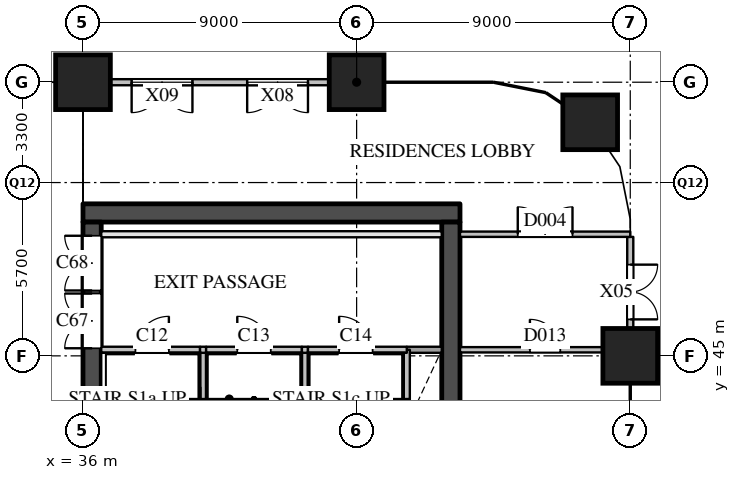
"""IFC4 building model, lengths in metres.
Left out: names, types, materials, properties, quantities, classifications, styles, units other than length and angle.
Written with IfcOpenShell. Run it as: python <this file> out.ifc"""

import sys

from ifc_helpers import new_model, si_unit, direction, frame, frame_2d, origin, origin_2d, place, context, subcontext, project, spatial, rectangle, extrude, element, fill, save


model = new_model("IFC4")
c1 = context("Model", 3, precision=1e-05, world=origin(), true_north=direction((0.0, 1.0)))
c2 = subcontext(c1, "Body", "Model", "MODEL_VIEW")
j1 = project(units=[si_unit("LENGTHUNIT", "METRE"), si_unit("PLANEANGLEUNIT", "RADIAN")], contexts=[c1])
p1 = place(None, origin())
s1 = spatial("IfcSite", under=j1, at=p1, CompositionType="ELEMENT")
p2 = place(p1, origin())
s2 = spatial("IfcBuilding", under=s1, at=p2, CompositionType="ELEMENT")
p3 = place(p2, origin())
s3 = spatial("IfcBuildingStorey", under=s2, at=p3, CompositionType="ELEMENT", Elevation=0.0)
for number, where, z_axis, x_axis in (
    (1, (36.0, 54.0, 0.0), (0.0, 0.0, 1.0), (1.0, 0.0, 0.0)),
    (2, (45.0, 54.0, 0.0), (0.0, 0.0, 1.0), (1.0, 0.0, 0.0)),
    (3, (54.0, 45.0, 0.0), (0.0, 0.0, 1.0), (1.0, 0.0, 0.0)),
    (4, (52.682, 52.682, 0.0), (0.0, 0.0, 1.0), (1.0, 0.0, 0.0)),
):
    element("IfcColumn", number, at=place(p3, frame(where, z_axis=z_axis, x_axis=x_axis)), inside=s3, PredefinedType="COLUMN", context=c2, shape_type="SweptSolid", body=[
        extrude(rectangle(XDim=1.8, YDim=1.8, at=origin_2d()), origin(), (0.0, 0.0, 1.0), 8.0),
    ])
p4 = place(p3, frame((54.0, 45.9, 0.0), z_axis=(0.0, 0.0, 1.0), x_axis=(0.0, 1.0, 0.0)))
e5 = element("IfcWall", 5, at=p4, inside=s3, PredefinedType="SOLIDWALL", context=c2, shape_type="SweptSolid", body=[
    extrude(rectangle(XDim=3.013, YDim=0.2, at=frame_2d((1.506, 0.0))), origin(), (0.0, 0.0, 1.0), 6.59),
])
p5 = place(p4, frame((2.1, 0.0, 0.0), z_axis=(0.0, 0.0, 1.0), x_axis=(-1.0, 0.0, 0.0)))
e6 = element("IfcOpeningElement", 6, at=p5, cuts=e5, PredefinedType="OPENING", context=c2, shape_type="SweptSolid", body=[
    extrude(rectangle(XDim=1.8, YDim=2.4, at=frame_2d((0.9, 1.2))), frame((0.0, 0.11, 0.0), z_axis=(0.0, -1.0, 0.0), x_axis=(1.0, 0.0, 0.0)), (0.0, 0.0, 1.0), 0.22),
])
p6 = place(p3, frame((44.1, 54.0, 0.0), z_axis=(0.0, 0.0, 1.0), x_axis=(-1.0, 0.0, 0.0)))
e7 = element("IfcWall", 7, at=p6, inside=s3, PredefinedType="SOLIDWALL", context=c2, shape_type="SweptSolid", body=[
    extrude(rectangle(XDim=7.2, YDim=0.2, at=frame_2d((3.6, 0.0))), origin(), (0.0, 0.0, 1.0), 6.59),
])
p7 = place(p6, frame((0.7, 0.0, 0.0)))
e8 = element("IfcOpeningElement", 8, at=p7, cuts=e7, PredefinedType="OPENING", context=c2, shape_type="SweptSolid", body=[
    extrude(rectangle(XDim=2.0, YDim=2.4, at=frame_2d((1.0, 1.2))), frame((0.0, 0.11, 0.0), z_axis=(0.0, -1.0, 0.0), x_axis=(1.0, 0.0, 0.0)), (0.0, 0.0, 1.0), 0.22),
])
p8 = place(p6, frame((0.7, 0.0, 2.5)))
e9 = element("IfcOpeningElement", 9, at=p8, cuts=e7, PredefinedType="OPENING", context=c2, shape_type="SweptSolid", body=[
    extrude(rectangle(XDim=2.0, YDim=3.99, at=frame_2d((1.0, 1.995))), frame((0.0, 0.11, 0.0), z_axis=(0.0, -1.0, 0.0), x_axis=(1.0, 0.0, 0.0)), (0.0, 0.0, 1.0), 0.22),
])
p9 = place(p6, frame((4.5, 0.0, 0.0)))
e10 = element("IfcOpeningElement", 10, at=p9, cuts=e7, PredefinedType="OPENING", context=c2, shape_type="SweptSolid", body=[
    extrude(rectangle(XDim=2.0, YDim=2.4, at=frame_2d((1.0, 1.2))), frame((0.0, 0.11, 0.0), z_axis=(0.0, -1.0, 0.0), x_axis=(1.0, 0.0, 0.0)), (0.0, 0.0, 1.0), 0.22),
])
p10 = place(p6, frame((4.5, 0.0, 2.5)))
e11 = element("IfcOpeningElement", 11, at=p10, cuts=e7, PredefinedType="OPENING", context=c2, shape_type="SweptSolid", body=[
    extrude(rectangle(XDim=2.0, YDim=3.99, at=frame_2d((1.0, 1.995))), frame((0.0, 0.11, 0.0), z_axis=(0.0, -1.0, 0.0), x_axis=(1.0, 0.0, 0.0)), (0.0, 0.0, 1.0), 0.22),
])
p11 = place(p3, frame((36.0, 49.7, 0.0), z_axis=(0.0, 0.0, 1.0), x_axis=(1.0, 0.0, 0.0)))
e12 = element("IfcWall", 12, at=p11, inside=s3, PredefinedType="SHEAR", context=c2, shape_type="SweptSolid", body=[
    extrude(rectangle(XDim=12.4, YDim=0.6, at=frame_2d((6.2, 0.0))), origin(), (0.0, 0.0, 1.0), 7.59),
])
p12 = place(p3, frame((36.3, 29.1, 0.0), z_axis=(0.0, 0.0, 1.0), x_axis=(0.0, 1.0, 0.0)))
e13 = element("IfcWall", 13, at=p12, inside=s3, PredefinedType="SHEAR", context=c2, shape_type="SweptSolid", body=[
    extrude(rectangle(XDim=20.3, YDim=0.6, at=frame_2d((10.15, 0.0))), origin(), (0.0, 0.0, 1.0), 7.59),
])
p13 = place(p12, frame((3.6, 0.0, 0.0)))
e14 = element("IfcOpeningElement", 14, at=p13, cuts=e13, PredefinedType="OPENING", context=c2, shape_type="SweptSolid", body=[
    extrude(rectangle(XDim=1.8, YDim=2.1, at=frame_2d((0.9, 1.05))), frame((0.0, 0.31, 0.0), z_axis=(0.0, -1.0, 0.0), x_axis=(1.0, 0.0, 0.0)), (0.0, 0.0, 1.0), 0.62),
])
p14 = place(p12, frame((16.15, 0.0, 0.0)))
e15 = element("IfcOpeningElement", 15, at=p14, cuts=e13, PredefinedType="OPENING", context=c2, shape_type="SweptSolid", body=[
    extrude(rectangle(XDim=1.8, YDim=2.4, at=frame_2d((0.9, 1.2))), frame((0.0, 0.31, 0.0), z_axis=(0.0, -1.0, 0.0), x_axis=(1.0, 0.0, 0.0)), (0.0, 0.0, 1.0), 0.62),
])
p15 = place(p12, frame((18.05, 0.0, 0.0)))
e16 = element("IfcOpeningElement", 16, at=p15, cuts=e13, PredefinedType="OPENING", context=c2, shape_type="SweptSolid", body=[
    extrude(rectangle(XDim=1.8, YDim=2.4, at=frame_2d((0.9, 1.2))), frame((0.0, 0.31, 0.0), z_axis=(0.0, -1.0, 0.0), x_axis=(1.0, 0.0, 0.0)), (0.0, 0.0, 1.0), 0.62),
])
p16 = place(p3, frame((48.1, 29.1, 0.0), z_axis=(0.0, 0.0, 1.0), x_axis=(0.0, 1.0, 0.0)))
e17 = element("IfcWall", 17, at=p16, inside=s3, PredefinedType="SHEAR", context=c2, shape_type="SweptSolid", body=[
    extrude(rectangle(XDim=20.3, YDim=0.6, at=frame_2d((10.15, 0.0))), origin(), (0.0, 0.0, 1.0), 7.59),
])
p17 = place(p16, frame((12.5, 0.0, 0.0)))
e18 = element("IfcOpeningElement", 18, at=p17, cuts=e17, PredefinedType="OPENING", context=c2, shape_type="SweptSolid", body=[
    extrude(rectangle(XDim=0.7, YDim=2.1, at=frame_2d((0.35, 1.05))), frame((0.0, 0.31, 0.0), z_axis=(0.0, -1.0, 0.0), x_axis=(1.0, 0.0, 0.0)), (0.0, 0.0, 1.0), 0.62),
])
p18 = place(p16, frame((4.0, 0.0, 0.0)))
e19 = element("IfcOpeningElement", 19, at=p18, cuts=e17, PredefinedType="OPENING", context=c2, shape_type="SweptSolid", body=[
    extrude(rectangle(XDim=1.0, YDim=2.1, at=frame_2d((0.5, 1.05))), frame((0.0, 0.31, 0.0), z_axis=(0.0, -1.0, 0.0), x_axis=(1.0, 0.0, 0.0)), (0.0, 0.0, 1.0), 0.62),
])
p19 = place(p3, frame((39.95, 41.06, 0.0), z_axis=(0.0, 0.0, 1.0), x_axis=(0.0, 1.0, 0.0)))
e20 = element("IfcWall", 20, at=p19, inside=s3, PredefinedType="SOLIDWALL", context=c2, shape_type="SweptSolid", body=[
    extrude(rectangle(XDim=2.52, YDim=0.2, at=frame_2d((1.26, 0.0))), origin(), (0.0, 0.0, 1.0), 7.59),
])
p20 = place(p3, frame((39.95, 43.58, 0.0), z_axis=(0.0, 0.0, 1.0), x_axis=(0.0, 1.0, 0.0)))
e21 = element("IfcWall", 21, at=p20, inside=s3, PredefinedType="SOLIDWALL", context=c2, shape_type="SweptSolid", body=[
    extrude(rectangle(XDim=1.62, YDim=0.2, at=frame_2d((0.81, 0.0))), origin(), (0.0, 0.0, 1.0), 7.59),
])
p21 = place(p3, frame((43.3, 41.06, 0.0), z_axis=(0.0, 0.0, 1.0), x_axis=(0.0, 1.0, 0.0)))
e22 = element("IfcWall", 22, at=p21, inside=s3, PredefinedType="SOLIDWALL", context=c2, shape_type="SweptSolid", body=[
    extrude(rectangle(XDim=2.52, YDim=0.2, at=frame_2d((1.26, 0.0))), origin(), (0.0, 0.0, 1.0), 7.59),
])
p22 = place(p3, frame((43.3, 43.58, 0.0), z_axis=(0.0, 0.0, 1.0), x_axis=(0.0, 1.0, 0.0)))
e23 = element("IfcWall", 23, at=p22, inside=s3, PredefinedType="SOLIDWALL", context=c2, shape_type="SweptSolid", body=[
    extrude(rectangle(XDim=1.62, YDim=0.2, at=frame_2d((0.81, 0.0))), origin(), (0.0, 0.0, 1.0), 7.59),
])
p23 = place(p3, frame((46.65, 41.06, 0.0), z_axis=(0.0, 0.0, 1.0), x_axis=(0.0, 1.0, 0.0)))
e24 = element("IfcWall", 24, at=p23, inside=s3, PredefinedType="SOLIDWALL", context=c2, shape_type="SweptSolid", body=[
    extrude(rectangle(XDim=2.52, YDim=0.2, at=frame_2d((1.26, 0.0))), origin(), (0.0, 0.0, 1.0), 7.59),
])
p24 = place(p3, frame((46.65, 43.58, 0.0), z_axis=(0.0, 0.0, 1.0), x_axis=(0.0, 1.0, 0.0)))
e25 = element("IfcWall", 25, at=p24, inside=s3, PredefinedType="SOLIDWALL", context=c2, shape_type="SweptSolid", body=[
    extrude(rectangle(XDim=1.62, YDim=0.2, at=frame_2d((0.81, 0.0))), origin(), (0.0, 0.0, 1.0), 7.59),
])
p25 = place(p3, frame((46.65, 45.2, 0.0), z_axis=(0.0, 0.0, 1.0), x_axis=(1.0, 0.0, 0.0)))
e26 = element("IfcWall", 26, at=p25, inside=s3, PredefinedType="SOLIDWALL", context=c2, shape_type="SweptSolid", body=[
    extrude(rectangle(XDim=1.15, YDim=0.2, at=frame_2d((0.575, 0.0))), origin(), (0.0, 0.0, 1.0), 7.59),
])
p26 = place(p3, frame((36.6, 45.2, 0.0), z_axis=(0.0, 0.0, 1.0), x_axis=(1.0, 0.0, 0.0)))
e27 = element("IfcWall", 27, at=p26, inside=s3, PredefinedType="SOLIDWALL", context=c2, shape_type="SweptSolid", body=[
    extrude(rectangle(XDim=3.25, YDim=0.2, at=frame_2d((1.625, 0.0))), origin(), (0.0, 0.0, 1.0), 7.59),
])
p27 = place(p26, frame((1.125, 0.0, 0.0)))
e28 = element("IfcOpeningElement", 28, at=p27, cuts=e27, PredefinedType="OPENING", context=c2, shape_type="SweptSolid", body=[
    extrude(rectangle(XDim=1.1, YDim=2.1, at=frame_2d((0.55, 1.05))), frame((0.0, 0.11, 0.0), z_axis=(0.0, -1.0, 0.0), x_axis=(1.0, 0.0, 0.0)), (0.0, 0.0, 1.0), 0.22),
])
p28 = place(p3, frame((39.85, 45.2, 0.0), z_axis=(0.0, 0.0, 1.0), x_axis=(1.0, 0.0, 0.0)))
e29 = element("IfcWall", 29, at=p28, inside=s3, PredefinedType="SOLIDWALL", context=c2, shape_type="SweptSolid", body=[
    extrude(rectangle(XDim=0.2, YDim=0.2, at=frame_2d((0.1, 0.0))), origin(), (0.0, 0.0, 1.0), 7.59),
])
p29 = place(p3, frame((40.05, 45.2, 0.0), z_axis=(0.0, 0.0, 1.0), x_axis=(1.0, 0.0, 0.0)))
e30 = element("IfcWall", 30, at=p29, inside=s3, PredefinedType="SOLIDWALL", context=c2, shape_type="SweptSolid", body=[
    extrude(rectangle(XDim=3.15, YDim=0.2, at=frame_2d((1.575, 0.0))), origin(), (0.0, 0.0, 1.0), 7.59),
])
p30 = place(p29, frame((1.025, 0.0, 0.0)))
e31 = element("IfcOpeningElement", 31, at=p30, cuts=e30, PredefinedType="OPENING", context=c2, shape_type="SweptSolid", body=[
    extrude(rectangle(XDim=1.1, YDim=2.1, at=frame_2d((0.55, 1.05))), frame((0.0, 0.11, 0.0), z_axis=(0.0, -1.0, 0.0), x_axis=(1.0, 0.0, 0.0)), (0.0, 0.0, 1.0), 0.22),
])
p31 = place(p3, frame((43.2, 45.2, 0.0), z_axis=(0.0, 0.0, 1.0), x_axis=(1.0, 0.0, 0.0)))
e32 = element("IfcWall", 32, at=p31, inside=s3, PredefinedType="SOLIDWALL", context=c2, shape_type="SweptSolid", body=[
    extrude(rectangle(XDim=0.2, YDim=0.2, at=frame_2d((0.1, 0.0))), origin(), (0.0, 0.0, 1.0), 7.59),
])
p32 = place(p3, frame((43.4, 45.2, 0.0), z_axis=(0.0, 0.0, 1.0), x_axis=(1.0, 0.0, 0.0)))
e33 = element("IfcWall", 33, at=p32, inside=s3, PredefinedType="SOLIDWALL", context=c2, shape_type="SweptSolid", body=[
    extrude(rectangle(XDim=3.25, YDim=0.2, at=frame_2d((1.625, 0.0))), origin(), (0.0, 0.0, 1.0), 7.59),
])
p33 = place(p32, frame((1.025, 0.0, 0.0)))
e34 = element("IfcOpeningElement", 34, at=p33, cuts=e33, PredefinedType="OPENING", context=c2, shape_type="SweptSolid", body=[
    extrude(rectangle(XDim=1.1, YDim=2.1, at=frame_2d((0.55, 1.05))), frame((0.0, 0.11, 0.0), z_axis=(0.0, -1.0, 0.0), x_axis=(1.0, 0.0, 0.0)), (0.0, 0.0, 1.0), 0.22),
])
p34 = place(p3, frame((36.6, 49.0, 0.0), z_axis=(0.0, 0.0, 1.0), x_axis=(1.0, 0.0, 0.0)))
e35 = element("IfcWall", 35, at=p34, inside=s3, PredefinedType="PARTITIONING", context=c2, shape_type="SweptSolid", body=[
    extrude(rectangle(XDim=11.2, YDim=0.2, at=frame_2d((5.6, 0.0))), origin(), (0.0, 0.0, 1.0), 7.59),
])
p35 = place(p3, frame((48.4, 45.2, 0.0), z_axis=(0.0, 0.0, 1.0), x_axis=(1.0, 0.0, 0.0)))
e36 = element("IfcWall", 36, at=p35, inside=s3, PredefinedType="PARTITIONING", context=c2, shape_type="SweptSolid", body=[
    extrude(rectangle(XDim=5.6, YDim=0.175, at=frame_2d((2.8, 0.0))), origin(), (0.0, 0.0, 1.0), 7.59),
])
p36 = place(p35, frame((2.3, 0.0, 0.0)))
e37 = element("IfcOpeningElement", 37, at=p36, cuts=e36, PredefinedType="OPENING", context=c2, shape_type="SweptSolid", body=[
    extrude(rectangle(XDim=1.0, YDim=2.1, at=frame_2d((0.5, 1.05))), frame((0.0, 0.097, 0.0), z_axis=(0.0, -1.0, 0.0), x_axis=(1.0, 0.0, 0.0)), (0.0, 0.0, 1.0), 0.195),
])
p37 = place(p3, frame((48.4, 49.0, 0.0), z_axis=(0.0, 0.0, 1.0), x_axis=(1.0, 0.0, 0.0)))
e38 = element("IfcWall", 38, at=p37, inside=s3, PredefinedType="PARTITIONING", context=c2, shape_type="SweptSolid", body=[
    extrude(rectangle(XDim=5.6, YDim=0.175, at=frame_2d((2.8, 0.0))), origin(), (0.0, 0.0, 1.0), 6.59),
])
p38 = place(p37, frame((1.9, 0.0, 0.0)))
e39 = element("IfcOpeningElement", 39, at=p38, cuts=e38, PredefinedType="OPENING", context=c2, shape_type="SweptSolid", body=[
    extrude(rectangle(XDim=1.8, YDim=2.1, at=frame_2d((0.9, 1.05))), frame((0.0, 0.097, 0.0), z_axis=(0.0, -1.0, 0.0), x_axis=(1.0, 0.0, 0.0)), (0.0, 0.0, 1.0), 0.195),
])
p39 = place(p5, origin())
e40 = element("IfcDoor", 40, at=p39, inside=s3, OperationType="DOUBLE_DOOR_SINGLE_SWING", PredefinedType="DOOR", context=c2, shape_type="SweptSolid", body=[
    extrude(rectangle(XDim=1.8, YDim=2.4, at=frame_2d((0.9, 1.2))), frame((0.0, 0.025, 0.0), z_axis=(0.0, -1.0, 0.0), x_axis=(1.0, 0.0, 0.0)), (0.0, 0.0, 1.0), 0.05),
])
fill(e6, e40)
p40 = place(p7, origin())
e41 = element("IfcDoor", 41, at=p40, inside=s3, OperationType="DOUBLE_DOOR_SINGLE_SWING", PredefinedType="DOOR", context=c2, shape_type="SweptSolid", body=[
    extrude(rectangle(XDim=2.0, YDim=2.4, at=frame_2d((1.0, 1.2))), frame((0.0, 0.025, 0.0), z_axis=(0.0, -1.0, 0.0), x_axis=(1.0, 0.0, 0.0)), (0.0, 0.0, 1.0), 0.05),
])
fill(e8, e41)
p41 = place(p8, origin())
e42 = element("IfcWindow", 42, at=p41, inside=s3, PartitioningType="SINGLE_PANEL", PredefinedType="WINDOW", context=c2, shape_type="SweptSolid", body=[
    extrude(rectangle(XDim=2.0, YDim=3.99, at=frame_2d((1.0, 1.995))), frame((0.0, 0.03, 0.0), z_axis=(0.0, -1.0, 0.0), x_axis=(1.0, 0.0, 0.0)), (0.0, 0.0, 1.0), 0.06),
])
fill(e9, e42)
p42 = place(p9, origin())
e43 = element("IfcDoor", 43, at=p42, inside=s3, OperationType="DOUBLE_DOOR_SINGLE_SWING", PredefinedType="DOOR", context=c2, shape_type="SweptSolid", body=[
    extrude(rectangle(XDim=2.0, YDim=2.4, at=frame_2d((1.0, 1.2))), frame((0.0, 0.025, 0.0), z_axis=(0.0, -1.0, 0.0), x_axis=(1.0, 0.0, 0.0)), (0.0, 0.0, 1.0), 0.05),
])
fill(e10, e43)
p43 = place(p10, origin())
e44 = element("IfcWindow", 44, at=p43, inside=s3, PartitioningType="SINGLE_PANEL", PredefinedType="WINDOW", context=c2, shape_type="SweptSolid", body=[
    extrude(rectangle(XDim=2.0, YDim=3.99, at=frame_2d((1.0, 1.995))), frame((0.0, 0.03, 0.0), z_axis=(0.0, -1.0, 0.0), x_axis=(1.0, 0.0, 0.0)), (0.0, 0.0, 1.0), 0.06),
])
fill(e11, e44)
p44 = place(p27, origin())
e45 = element("IfcDoor", 45, at=p44, inside=s3, OperationType="SINGLE_SWING_RIGHT", PredefinedType="DOOR", context=c2, shape_type="SweptSolid", body=[
    extrude(rectangle(XDim=1.1, YDim=2.1, at=frame_2d((0.55, 1.05))), frame((0.0, 0.025, 0.0), z_axis=(0.0, -1.0, 0.0), x_axis=(1.0, 0.0, 0.0)), (0.0, 0.0, 1.0), 0.05),
])
fill(e28, e45)
p45 = place(p30, origin())
e46 = element("IfcDoor", 46, at=p45, inside=s3, OperationType="SINGLE_SWING_LEFT", PredefinedType="DOOR", context=c2, shape_type="SweptSolid", body=[
    extrude(rectangle(XDim=1.1, YDim=2.1, at=frame_2d((0.55, 1.05))), frame((0.0, 0.025, 0.0), z_axis=(0.0, -1.0, 0.0), x_axis=(1.0, 0.0, 0.0)), (0.0, 0.0, 1.0), 0.05),
])
fill(e31, e46)
p46 = place(p33, origin())
e47 = element("IfcDoor", 47, at=p46, inside=s3, OperationType="SINGLE_SWING_LEFT", PredefinedType="DOOR", context=c2, shape_type="SweptSolid", body=[
    extrude(rectangle(XDim=1.1, YDim=2.1, at=frame_2d((0.55, 1.05))), frame((0.0, 0.025, 0.0), z_axis=(0.0, -1.0, 0.0), x_axis=(1.0, 0.0, 0.0)), (0.0, 0.0, 1.0), 0.05),
])
fill(e34, e47)
p47 = place(p14, origin())
e48 = element("IfcDoor", 48, at=p47, inside=s3, OperationType="DOUBLE_DOOR_SINGLE_SWING", PredefinedType="DOOR", context=c2, shape_type="SweptSolid", body=[
    extrude(rectangle(XDim=1.8, YDim=2.4, at=frame_2d((0.9, 1.2))), frame((0.0, 0.025, 0.0), z_axis=(0.0, -1.0, 0.0), x_axis=(1.0, 0.0, 0.0)), (0.0, 0.0, 1.0), 0.05),
])
fill(e15, e48)
p48 = place(p15, origin())
e49 = element("IfcDoor", 49, at=p48, inside=s3, OperationType="DOUBLE_DOOR_SINGLE_SWING", PredefinedType="DOOR", context=c2, shape_type="SweptSolid", body=[
    extrude(rectangle(XDim=1.8, YDim=2.4, at=frame_2d((0.9, 1.2))), frame((0.0, 0.025, 0.0), z_axis=(0.0, -1.0, 0.0), x_axis=(1.0, 0.0, 0.0)), (0.0, 0.0, 1.0), 0.05),
])
fill(e16, e49)
p49 = place(p38, origin())
e50 = element("IfcDoor", 50, at=p49, inside=s3, OperationType="DOUBLE_DOOR_SINGLE_SWING", PredefinedType="DOOR", context=c2, shape_type="SweptSolid", body=[
    extrude(rectangle(XDim=1.8, YDim=2.1, at=frame_2d((0.9, 1.05))), frame((0.0, 0.025, 0.0), z_axis=(0.0, -1.0, 0.0), x_axis=(1.0, 0.0, 0.0)), (0.0, 0.0, 1.0), 0.05),
])
fill(e39, e50)
p50 = place(p36, origin())
e51 = element("IfcDoor", 51, at=p50, inside=s3, OperationType="SINGLE_SWING_LEFT", PredefinedType="DOOR", context=c2, shape_type="SweptSolid", body=[
    extrude(rectangle(XDim=1.0, YDim=2.1, at=frame_2d((0.5, 1.05))), frame((0.0, 0.025, 0.0), z_axis=(0.0, -1.0, 0.0), x_axis=(1.0, 0.0, 0.0)), (0.0, 0.0, 1.0), 0.05),
])
fill(e37, e51)
save(model, sys.argv[1])
